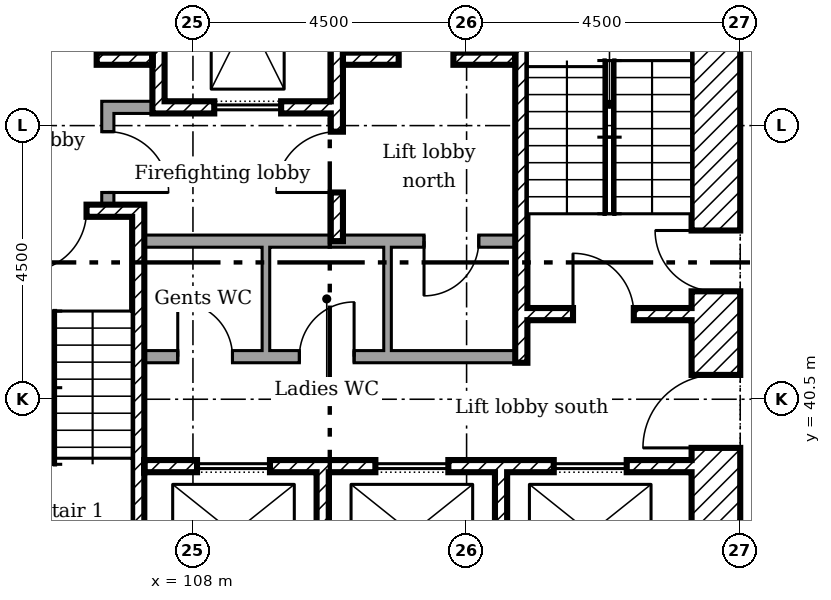
"""IFC4 building model, lengths in metres.
Left out: names, types, materials, properties, quantities, classifications, styles, units other than length and angle.
Written with IfcOpenShell. Run it as: python <this file> out.ifc"""

import sys

from ifc_helpers import new_model, si_unit, direction, frame, frame_2d, origin, place, context, subcontext, project, spatial, rectangle, extrude, element, fill, save


model = new_model("IFC4")
c1 = context("Model", 3, precision=1e-05, world=origin(), true_north=direction((0.0, 1.0)))
c2 = subcontext(c1, "Body", "Model", "MODEL_VIEW")
j1 = project(units=[si_unit("LENGTHUNIT", "METRE"), si_unit("PLANEANGLEUNIT", "RADIAN")], contexts=[c1])
p1 = place(None, origin())
s1 = spatial("IfcSite", under=j1, at=p1, CompositionType="ELEMENT")
p2 = place(p1, origin())
s2 = spatial("IfcBuilding", under=s1, at=p2, CompositionType="ELEMENT")
p3 = place(p2, frame((0.0, 0.0, 54.6)))
s3 = spatial("IfcBuildingStorey", under=s2, at=p3, CompositionType="ELEMENT", Elevation=54.6)
p4 = place(p3, frame((116.6, 36.0, 0.0), z_axis=(0.0, 0.0, 1.0), x_axis=(0.0, 1.0, 0.0)))
e1 = element("IfcWall", 1, at=p4, inside=s3, PredefinedType="SHEAR", context=c2, shape_type="SweptSolid", body=[
    extrude(rectangle(XDim=13.5, YDim=0.8, at=frame_2d((6.75, 0.0))), origin(), (0.0, 0.0, 1.0), 3.35),
])
p5 = place(p4, frame((3.7, 0.0, 0.0)))
e2 = element("IfcOpeningElement", 2, at=p5, cuts=e1, PredefinedType="OPENING", context=c2, shape_type="SweptSolid", body=[
    extrude(rectangle(XDim=1.2, YDim=2.1, at=frame_2d((0.6, 1.05))), frame((0.0, 0.41, 0.0), z_axis=(0.0, -1.0, 0.0), x_axis=(1.0, 0.0, 0.0)), (0.0, 0.0, 1.0), 0.82),
])
p6 = place(p4, frame((6.275, 0.0, 0.0)))
e3 = element("IfcOpeningElement", 3, at=p6, cuts=e1, PredefinedType="OPENING", context=c2, shape_type="SweptSolid", body=[
    extrude(rectangle(XDim=1.0, YDim=2.1, at=frame_2d((0.5, 1.05))), frame((0.0, 0.41, 0.0), z_axis=(0.0, -1.0, 0.0), x_axis=(1.0, 0.0, 0.0)), (0.0, 0.0, 1.0), 0.82),
])
p7 = place(p3, frame((107.433, 48.7, 0.0), z_axis=(0.0, 0.0, 1.0), x_axis=(0.0, -1.0, 0.0)))
e4 = element("IfcWall", 4, at=p7, inside=s3, PredefinedType="SHEAR", context=c2, shape_type="SweptSolid", body=[
    extrude(rectangle(XDim=3.5, YDim=0.2, at=frame_2d((1.75, 0.0))), origin(), (0.0, 0.0, 1.0), 3.35),
])
p8 = place(p3, frame((110.367, 48.7, 0.0), z_axis=(0.0, 0.0, 1.0), x_axis=(0.0, -1.0, 0.0)))
e5 = element("IfcWall", 5, at=p8, inside=s3, PredefinedType="SHEAR", context=c2, shape_type="SweptSolid", body=[
    extrude(rectangle(XDim=5.6, YDim=0.2, at=frame_2d((2.8, 0.0))), origin(), (0.0, 0.0, 1.0), 3.35),
])
p9 = place(p8, frame((3.8, 0.0, 0.0)))
e6 = element("IfcOpeningElement", 6, at=p9, cuts=e5, PredefinedType="OPENING", context=c2, shape_type="SweptSolid", body=[
    extrude(rectangle(XDim=1.0, YDim=2.1, at=frame_2d((0.5, 1.05))), frame((0.0, 0.11, 0.0), z_axis=(0.0, -1.0, 0.0), x_axis=(1.0, 0.0, 0.0)), (0.0, 0.0, 1.0), 0.22),
])
for number, where, z_axis, x_axis in (
    (7, (110.133, 36.8, 0.0), (0.0, 0.0, 1.0), (0.0, 1.0, 0.0)),
    (8, (113.067, 36.8, 0.0), (0.0, 0.0, 1.0), (0.0, 1.0, 0.0)),
):
    element("IfcWall", number, at=place(p3, frame(where, z_axis=z_axis, x_axis=x_axis)), inside=s3, PredefinedType="SHEAR", context=c2, shape_type="SweptSolid", body=[
        extrude(rectangle(XDim=2.5, YDim=0.2, at=frame_2d((1.25, 0.0))), origin(), (0.0, 0.0, 1.0), 3.35),
    ])
p10 = place(p3, frame((106.5, 45.3, 0.0)))
e9 = element("IfcWall", 9, at=p10, inside=s3, PredefinedType="PARTITIONING", context=c2, shape_type="SweptSolid", body=[
    extrude(rectangle(XDim=0.833, YDim=0.2, at=frame_2d((0.417, 0.0))), origin(), (0.0, 0.0, 1.0), 3.35),
])
p11 = place(p3, frame((106.6, 43.7, 0.0), z_axis=(0.0, 0.0, 1.0), x_axis=(0.0, 1.0, 0.0)))
e10 = element("IfcWall", 10, at=p11, inside=s3, PredefinedType="PARTITIONING", context=c2, shape_type="SweptSolid", body=[
    extrude(rectangle(XDim=1.5, YDim=0.2, at=frame_2d((0.75, 0.0))), origin(), (0.0, 0.0, 1.0), 3.35),
])
p12 = place(p11, frame((0.2, 0.0, 0.0)))
e11 = element("IfcOpeningElement", 11, at=p12, cuts=e10, PredefinedType="OPENING", context=c2, shape_type="SweptSolid", body=[
    extrude(rectangle(XDim=1.0, YDim=2.1, at=frame_2d((0.5, 1.05))), frame((0.0, 0.11, 0.0), z_axis=(0.0, -1.0, 0.0), x_axis=(1.0, 0.0, 0.0)), (0.0, 0.0, 1.0), 0.22),
])
p13 = place(p3, frame((104.3, 46.1, 0.0)))
e12 = element("IfcWall", 12, at=p13, inside=s3, PredefinedType="SHEAR", context=c2, shape_type="SweptSolid", body=[
    extrude(rectangle(XDim=3.033, YDim=0.2, at=frame_2d((1.517, 0.0))), origin(), (0.0, 0.0, 1.0), 3.35),
])
p14 = place(p13, frame((1.217, 0.0, 0.0)))
e13 = element("IfcOpeningElement", 13, at=p14, cuts=e12, PredefinedType="OPENING", context=c2, shape_type="SweptSolid", body=[
    extrude(rectangle(XDim=0.9, YDim=2.1, at=frame_2d((0.45, 1.05))), frame((0.0, 0.11, 0.0), z_axis=(0.0, -1.0, 0.0), x_axis=(1.0, 0.0, 0.0)), (0.0, 0.0, 1.0), 0.22),
])
p15 = place(p3, frame((110.467, 46.1, 0.0)))
e14 = element("IfcWall", 14, at=p15, inside=s3, PredefinedType="SHEAR", context=c2, shape_type="SweptSolid", body=[
    extrude(rectangle(XDim=2.833, YDim=0.2, at=frame_2d((1.417, 0.0))), origin(), (0.0, 0.0, 1.0), 3.35),
])
p16 = place(p15, frame((0.917, 0.0, 0.0)))
e15 = element("IfcOpeningElement", 15, at=p16, cuts=e14, PredefinedType="OPENING", context=c2, shape_type="SweptSolid", body=[
    extrude(rectangle(XDim=0.9, YDim=2.1, at=frame_2d((0.45, 1.05))), frame((0.0, 0.11, 0.0), z_axis=(0.0, -1.0, 0.0), x_axis=(1.0, 0.0, 0.0)), (0.0, 0.0, 1.0), 0.22),
])
p17 = place(p3, frame((107.533, 45.3, 0.0)))
e16 = element("IfcWall", 16, at=p17, inside=s3, PredefinedType="SHEAR", context=c2, shape_type="SweptSolid", body=[
    extrude(rectangle(XDim=2.733, YDim=0.2, at=frame_2d((1.367, 0.0))), origin(), (0.0, 0.0, 1.0), 3.35),
])
p18 = place(p17, frame((0.817, 0.0, 0.0)))
e17 = element("IfcOpeningElement", 17, at=p18, cuts=e16, PredefinedType="OPENING", context=c2, shape_type="SweptSolid", body=[
    extrude(rectangle(XDim=1.1, YDim=2.1, at=frame_2d((0.55, 1.05))), frame((0.0, 0.11, 0.0), z_axis=(0.0, -1.0, 0.0), x_axis=(1.0, 0.0, 0.0)), (0.0, 0.0, 1.0), 0.22),
])
p19 = place(p3, frame((107.2, 39.4, 0.0)))
e18 = element("IfcWall", 18, at=p19, inside=s3, PredefinedType="SHEAR", context=c2, shape_type="SweptSolid", body=[
    extrude(rectangle(XDim=9.0, YDim=0.2, at=frame_2d((4.5, 0.0))), origin(), (0.0, 0.0, 1.0), 3.35),
])
p20 = place(p19, frame((0.867, 0.0, 0.0)))
e19 = element("IfcOpeningElement", 19, at=p20, cuts=e18, PredefinedType="OPENING", context=c2, shape_type="SweptSolid", body=[
    extrude(rectangle(XDim=1.2, YDim=2.1, at=frame_2d((0.6, 1.05))), frame((0.0, 0.11, 0.0), z_axis=(0.0, -1.0, 0.0), x_axis=(1.0, 0.0, 0.0)), (0.0, 0.0, 1.0), 0.22),
])
p21 = place(p19, frame((3.8, 0.0, 0.0)))
e20 = element("IfcOpeningElement", 20, at=p21, cuts=e18, PredefinedType="OPENING", context=c2, shape_type="SweptSolid", body=[
    extrude(rectangle(XDim=1.2, YDim=2.1, at=frame_2d((0.6, 1.05))), frame((0.0, 0.11, 0.0), z_axis=(0.0, -1.0, 0.0), x_axis=(1.0, 0.0, 0.0)), (0.0, 0.0, 1.0), 0.22),
])
p22 = place(p19, frame((6.733, 0.0, 0.0)))
e21 = element("IfcOpeningElement", 21, at=p22, cuts=e18, PredefinedType="OPENING", context=c2, shape_type="SweptSolid", body=[
    extrude(rectangle(XDim=1.2, YDim=2.1, at=frame_2d((0.6, 1.05))), frame((0.0, 0.11, 0.0), z_axis=(0.0, -1.0, 0.0), x_axis=(1.0, 0.0, 0.0)), (0.0, 0.0, 1.0), 0.22),
])
p23 = place(p3, frame((107.1, 36.8, 0.0), z_axis=(0.0, 0.0, 1.0), x_axis=(0.0, 1.0, 0.0)))
e22 = element("IfcWall", 22, at=p23, inside=s3, PredefinedType="SHEAR", context=c2, shape_type="SweptSolid", body=[
    extrude(rectangle(XDim=6.9, YDim=0.2, at=frame_2d((3.45, 0.0))), origin(), (0.0, 0.0, 1.0), 3.35),
])
p24 = place(p3, frame((104.3, 43.6, 0.0)))
e23 = element("IfcWall", 23, at=p24, inside=s3, PredefinedType="SHEAR", context=c2, shape_type="SweptSolid", body=[
    extrude(rectangle(XDim=2.7, YDim=0.2, at=frame_2d((1.35, 0.0))), origin(), (0.0, 0.0, 1.0), 3.35),
])
p25 = place(p24, frame((0.95, 0.0, 0.0)))
e24 = element("IfcOpeningElement", 24, at=p25, cuts=e23, PredefinedType="OPENING", context=c2, shape_type="SweptSolid", body=[
    extrude(rectangle(XDim=1.0, YDim=2.1, at=frame_2d((0.5, 1.05))), frame((0.0, 0.11, 0.0), z_axis=(0.0, -1.0, 0.0), x_axis=(1.0, 0.0, 0.0)), (0.0, 0.0, 1.0), 0.22),
])
p26 = place(p3, frame((113.5, 41.9, 0.0)))
e25 = element("IfcWall", 25, at=p26, inside=s3, PredefinedType="SHEAR", context=c2, shape_type="SweptSolid", body=[
    extrude(rectangle(XDim=2.7, YDim=0.2, at=frame_2d((1.35, 0.0))), origin(), (0.0, 0.0, 1.0), 3.35),
])
p27 = place(p26, frame((0.75, 0.0, 0.0)))
e26 = element("IfcOpeningElement", 26, at=p27, cuts=e25, PredefinedType="OPENING", context=c2, shape_type="SweptSolid", body=[
    extrude(rectangle(XDim=1.0, YDim=2.1, at=frame_2d((0.5, 1.05))), frame((0.0, 0.11, 0.0), z_axis=(0.0, -1.0, 0.0), x_axis=(1.0, 0.0, 0.0)), (0.0, 0.0, 1.0), 0.22),
])
p28 = place(p3, frame((113.4, 41.1, 0.0), z_axis=(0.0, 0.0, 1.0), x_axis=(0.0, 1.0, 0.0)))
e27 = element("IfcWall", 27, at=p28, inside=s3, PredefinedType="SHEAR", context=c2, shape_type="SweptSolid", body=[
    extrude(rectangle(XDim=7.6, YDim=0.2, at=frame_2d((3.8, 0.0))), origin(), (0.0, 0.0, 1.0), 3.35),
])
p29 = place(p3, frame((107.2, 43.1, 0.0)))
e28 = element("IfcWall", 28, at=p29, inside=s3, PredefinedType="PARTITIONING", context=c2, shape_type="SweptSolid", body=[
    extrude(rectangle(XDim=6.1, YDim=0.2, at=frame_2d((3.05, 0.0))), origin(), (0.0, 0.0, 1.0), 3.35),
])
p30 = place(p29, frame((4.6, 0.0, 0.0)))
e29 = element("IfcOpeningElement", 29, at=p30, cuts=e28, PredefinedType="OPENING", context=c2, shape_type="SweptSolid", body=[
    extrude(rectangle(XDim=0.9, YDim=2.1, at=frame_2d((0.45, 1.05))), frame((0.0, 0.11, 0.0), z_axis=(0.0, -1.0, 0.0), x_axis=(1.0, 0.0, 0.0)), (0.0, 0.0, 1.0), 0.22),
])
p31 = place(p3, frame((107.2, 41.2, 0.0)))
e30 = element("IfcWall", 30, at=p31, inside=s3, PredefinedType="PARTITIONING", context=c2, shape_type="SweptSolid", body=[
    extrude(rectangle(XDim=6.1, YDim=0.2, at=frame_2d((3.05, 0.0))), origin(), (0.0, 0.0, 1.0), 3.35),
])
p32 = place(p31, frame((0.55, 0.0, 0.0)))
e31 = element("IfcOpeningElement", 31, at=p32, cuts=e30, PredefinedType="OPENING", context=c2, shape_type="SweptSolid", body=[
    extrude(rectangle(XDim=0.9, YDim=2.1, at=frame_2d((0.45, 1.05))), frame((0.0, 0.11, 0.0), z_axis=(0.0, -1.0, 0.0), x_axis=(1.0, 0.0, 0.0)), (0.0, 0.0, 1.0), 0.22),
])
p33 = place(p31, frame((2.55, 0.0, 0.0)))
e32 = element("IfcOpeningElement", 32, at=p33, cuts=e30, PredefinedType="OPENING", context=c2, shape_type="SweptSolid", body=[
    extrude(rectangle(XDim=0.9, YDim=2.1, at=frame_2d((0.45, 1.05))), frame((0.0, 0.11, 0.0), z_axis=(0.0, -1.0, 0.0), x_axis=(1.0, 0.0, 0.0)), (0.0, 0.0, 1.0), 0.22),
])
for number, where, z_axis, x_axis in (
    (33, (109.2, 41.3, 0.0), (0.0, 0.0, 1.0), (0.0, 1.0, 0.0)),
    (34, (111.2, 41.3, 0.0), (0.0, 0.0, 1.0), (0.0, 1.0, 0.0)),
):
    element("IfcWall", number, at=place(p3, frame(where, z_axis=z_axis, x_axis=x_axis)), inside=s3, PredefinedType="PARTITIONING", context=c2, shape_type="SweptSolid", body=[
        extrude(rectangle(XDim=1.7, YDim=0.125, at=frame_2d((0.85, 0.0))), origin(), (0.0, 0.0, 1.0), 3.35),
    ])
p34 = place(p5, origin())
e35 = element("IfcDoor", 35, at=p34, inside=s3, OperationType="SINGLE_SWING_RIGHT", PredefinedType="DOOR", context=c2, shape_type="SweptSolid", body=[
    extrude(rectangle(XDim=1.2, YDim=2.1, at=frame_2d((0.6, 1.05))), frame((0.0, 0.025, 0.0), z_axis=(0.0, -1.0, 0.0), x_axis=(1.0, 0.0, 0.0)), (0.0, 0.0, 1.0), 0.05),
])
fill(e2, e35)
p35 = place(p25, frame((1.0, 0.0, 0.0), x_axis=(-1.0, 0.0, 0.0)))
e36 = element("IfcDoor", 36, at=p35, inside=s3, OperationType="SINGLE_SWING_LEFT", PredefinedType="DOOR", context=c2, shape_type="SweptSolid", body=[
    extrude(rectangle(XDim=1.0, YDim=2.1, at=frame_2d((0.5, 1.05))), frame((0.0, 0.025, 0.0), z_axis=(0.0, -1.0, 0.0), x_axis=(1.0, 0.0, 0.0)), (0.0, 0.0, 1.0), 0.05),
])
fill(e24, e36)
p36 = place(p27, origin())
e37 = element("IfcDoor", 37, at=p36, inside=s3, OperationType="SINGLE_SWING_RIGHT", PredefinedType="DOOR", context=c2, shape_type="SweptSolid", body=[
    extrude(rectangle(XDim=1.0, YDim=2.1, at=frame_2d((0.5, 1.05))), frame((0.0, 0.025, 0.0), z_axis=(0.0, -1.0, 0.0), x_axis=(1.0, 0.0, 0.0)), (0.0, 0.0, 1.0), 0.05),
])
fill(e26, e37)
p37 = place(p6, origin())
e38 = element("IfcDoor", 38, at=p37, inside=s3, OperationType="SINGLE_SWING_LEFT", PredefinedType="DOOR", context=c2, shape_type="SweptSolid", body=[
    extrude(rectangle(XDim=1.0, YDim=2.1, at=frame_2d((0.5, 1.05))), frame((0.0, 0.025, 0.0), z_axis=(0.0, -1.0, 0.0), x_axis=(1.0, 0.0, 0.0)), (0.0, 0.0, 1.0), 0.05),
])
fill(e3, e38)
p38 = place(p9, frame((1.0, 0.0, 0.0), x_axis=(-1.0, 0.0, 0.0)))
e39 = element("IfcDoor", 39, at=p38, inside=s3, OperationType="SINGLE_SWING_RIGHT", PredefinedType="DOOR", context=c2, shape_type="SweptSolid", body=[
    extrude(rectangle(XDim=1.0, YDim=2.1, at=frame_2d((0.5, 1.05))), frame((0.0, 0.025, 0.0), z_axis=(0.0, -1.0, 0.0), x_axis=(1.0, 0.0, 0.0)), (0.0, 0.0, 1.0), 0.05),
])
fill(e6, e39)
p39 = place(p12, frame((1.0, 0.0, 0.0), x_axis=(-1.0, 0.0, 0.0)))
e40 = element("IfcDoor", 40, at=p39, inside=s3, OperationType="SINGLE_SWING_LEFT", PredefinedType="DOOR", context=c2, shape_type="SweptSolid", body=[
    extrude(rectangle(XDim=1.0, YDim=2.1, at=frame_2d((0.5, 1.05))), frame((0.0, 0.025, 0.0), z_axis=(0.0, -1.0, 0.0), x_axis=(1.0, 0.0, 0.0)), (0.0, 0.0, 1.0), 0.05),
])
fill(e11, e40)
p40 = place(p14, origin())
e41 = element("IfcDoor", 41, at=p40, inside=s3, OperationType="SINGLE_SWING_RIGHT", PredefinedType="DOOR", context=c2, shape_type="SweptSolid", body=[
    extrude(rectangle(XDim=0.9, YDim=2.1, at=frame_2d((0.45, 1.05))), frame((0.0, 0.025, 0.0), z_axis=(0.0, -1.0, 0.0), x_axis=(1.0, 0.0, 0.0)), (0.0, 0.0, 1.0), 0.05),
])
fill(e13, e41)
p41 = place(p16, origin())
e42 = element("IfcDoor", 42, at=p41, inside=s3, OperationType="SINGLE_SWING_RIGHT", PredefinedType="DOOR", context=c2, shape_type="SweptSolid", body=[
    extrude(rectangle(XDim=0.9, YDim=2.1, at=frame_2d((0.45, 1.05))), frame((0.0, 0.025, 0.0), z_axis=(0.0, -1.0, 0.0), x_axis=(1.0, 0.0, 0.0)), (0.0, 0.0, 1.0), 0.05),
])
fill(e15, e42)
p42 = place(p32, origin())
e43 = element("IfcDoor", 43, at=p42, inside=s3, OperationType="SINGLE_SWING_RIGHT", PredefinedType="DOOR", context=c2, shape_type="SweptSolid", body=[
    extrude(rectangle(XDim=0.9, YDim=2.1, at=frame_2d((0.45, 1.05))), frame((0.0, 0.025, 0.0), z_axis=(0.0, -1.0, 0.0), x_axis=(1.0, 0.0, 0.0)), (0.0, 0.0, 1.0), 0.05),
])
fill(e31, e43)
p43 = place(p33, origin())
e44 = element("IfcDoor", 44, at=p43, inside=s3, OperationType="SINGLE_SWING_LEFT", PredefinedType="DOOR", context=c2, shape_type="SweptSolid", body=[
    extrude(rectangle(XDim=0.9, YDim=2.1, at=frame_2d((0.45, 1.05))), frame((0.0, 0.025, 0.0), z_axis=(0.0, -1.0, 0.0), x_axis=(1.0, 0.0, 0.0)), (0.0, 0.0, 1.0), 0.05),
])
fill(e32, e44)
p44 = place(p30, frame((0.9, 0.0, 0.0), x_axis=(-1.0, 0.0, 0.0)))
e45 = element("IfcDoor", 45, at=p44, inside=s3, OperationType="SINGLE_SWING_LEFT", PredefinedType="DOOR", context=c2, shape_type="SweptSolid", body=[
    extrude(rectangle(XDim=0.9, YDim=2.1, at=frame_2d((0.45, 1.05))), frame((0.0, 0.025, 0.0), z_axis=(0.0, -1.0, 0.0), x_axis=(1.0, 0.0, 0.0)), (0.0, 0.0, 1.0), 0.05),
])
fill(e29, e45)
p45 = place(p18, origin())
e46 = element("IfcDoor", 46, at=p45, inside=s3, OperationType="SLIDING_TO_LEFT", PredefinedType="DOOR", context=c2, shape_type="SweptSolid", body=[
    extrude(rectangle(XDim=1.1, YDim=2.1, at=frame_2d((0.55, 1.05))), frame((0.0, 0.025, 0.0), z_axis=(0.0, -1.0, 0.0), x_axis=(1.0, 0.0, 0.0)), (0.0, 0.0, 1.0), 0.05),
])
fill(e17, e46)
p46 = place(p20, origin())
e47 = element("IfcDoor", 47, at=p46, inside=s3, OperationType="SLIDING_TO_LEFT", PredefinedType="DOOR", context=c2, shape_type="SweptSolid", body=[
    extrude(rectangle(XDim=1.2, YDim=2.1, at=frame_2d((0.6, 1.05))), frame((0.0, 0.025, 0.0), z_axis=(0.0, -1.0, 0.0), x_axis=(1.0, 0.0, 0.0)), (0.0, 0.0, 1.0), 0.05),
])
fill(e19, e47)
p47 = place(p21, origin())
e48 = element("IfcDoor", 48, at=p47, inside=s3, OperationType="SLIDING_TO_LEFT", PredefinedType="DOOR", context=c2, shape_type="SweptSolid", body=[
    extrude(rectangle(XDim=1.2, YDim=2.1, at=frame_2d((0.6, 1.05))), frame((0.0, 0.025, 0.0), z_axis=(0.0, -1.0, 0.0), x_axis=(1.0, 0.0, 0.0)), (0.0, 0.0, 1.0), 0.05),
])
fill(e20, e48)
p48 = place(p22, origin())
e49 = element("IfcDoor", 49, at=p48, inside=s3, OperationType="SLIDING_TO_LEFT", PredefinedType="DOOR", context=c2, shape_type="SweptSolid", body=[
    extrude(rectangle(XDim=1.2, YDim=2.1, at=frame_2d((0.6, 1.05))), frame((0.0, 0.025, 0.0), z_axis=(0.0, -1.0, 0.0), x_axis=(1.0, 0.0, 0.0)), (0.0, 0.0, 1.0), 0.05),
])
fill(e21, e49)
save(model, sys.argv[1])
